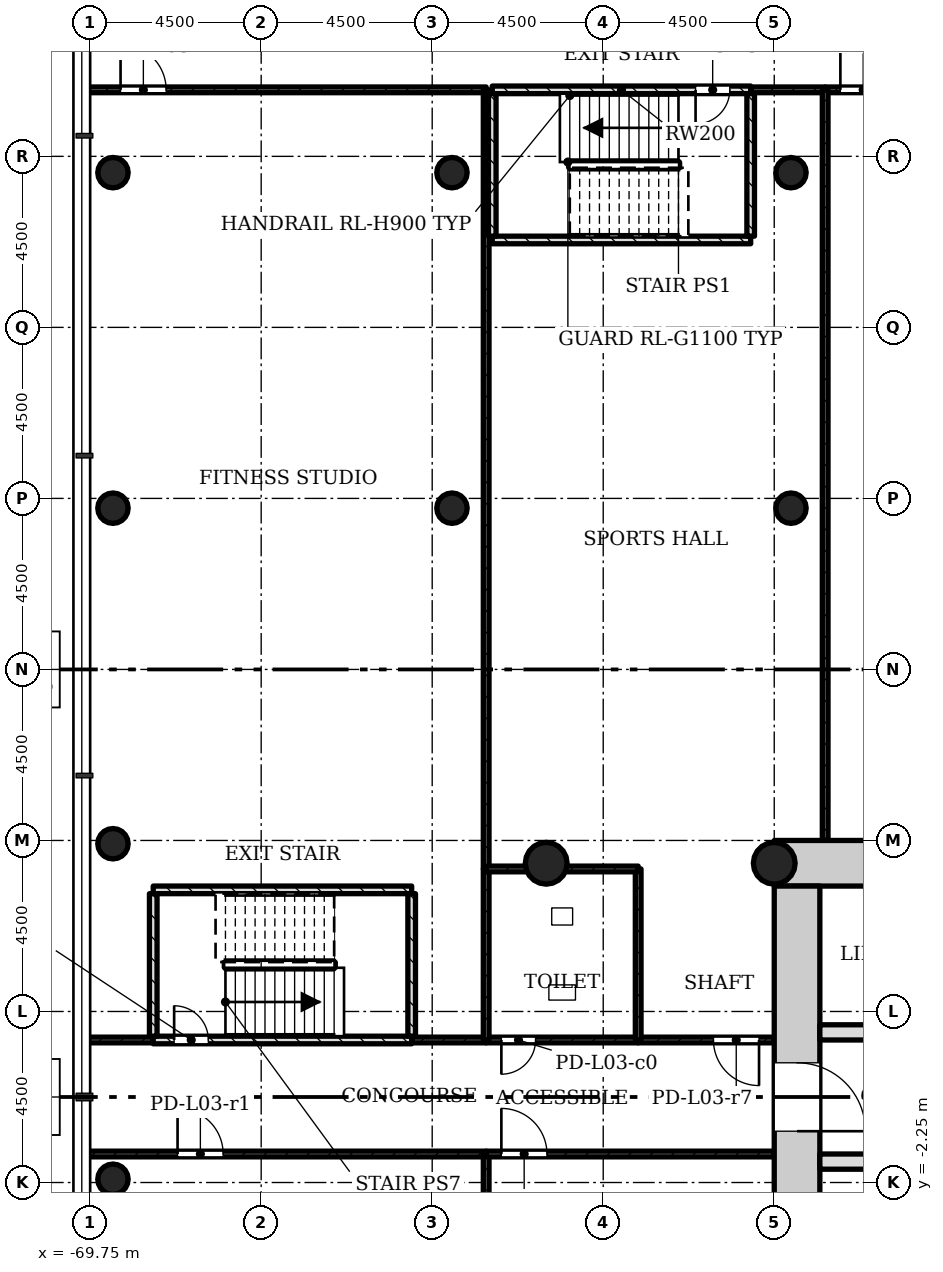
"""IFC4 building model, lengths in metres.
Left out: names, types, materials, properties, quantities, classifications, styles, units other than length and angle.
Written with IfcOpenShell. Run it as: python <this file> out.ifc"""

import sys

from ifc_helpers import new_model, si_unit, direction, frame, frame_2d, origin, origin_2d, place, context, subcontext, project, spatial, rectangle, hollow_circle, extrude, element, fill, save


model = new_model("IFC4")
c1 = context("Model", 3, precision=1e-05, world=origin(), true_north=direction((0.0, 1.0)))
c2 = subcontext(c1, "Body", "Model", "MODEL_VIEW")
j1 = project(units=[si_unit("LENGTHUNIT", "METRE"), si_unit("PLANEANGLEUNIT", "RADIAN")], contexts=[c1])
p1 = place(None, origin())
s1 = spatial("IfcSite", under=j1, at=p1, CompositionType="ELEMENT")
p2 = place(p1, origin())
s2 = spatial("IfcBuilding", under=s1, at=p2, CompositionType="ELEMENT")
p3 = place(p2, frame((0.0, 0.0, 15.5)))
s3 = spatial("IfcBuildingStorey", under=s2, at=p3, CompositionType="ELEMENT", Elevation=15.5)
p4 = place(p3, frame((-43.95, 6.15, 0.0), z_axis=(0.0, 0.0, 1.0), x_axis=(-1.0, 0.0, 0.0)))
e1 = element("IfcWall", 1, at=p4, inside=s3, PredefinedType="SHEAR", context=c2, shape_type="SweptSolid", body=[
    extrude(rectangle(XDim=7.8, YDim=1.2, at=frame_2d((3.9, 0.0))), origin(), (0.0, 0.0, 1.0), 4.5),
])
p5 = place(p3, frame((-51.15, 5.55, 0.0), z_axis=(0.0, 0.0, 1.0), x_axis=(0.0, -1.0, 0.0)))
e2 = element("IfcWall", 2, at=p5, inside=s3, PredefinedType="SHEAR", context=c2, shape_type="SweptSolid", body=[
    extrude(rectangle(XDim=12.3, YDim=1.2, at=frame_2d((6.15, 0.0))), origin(), (0.0, 0.0, 1.0), 4.5),
])
p6 = place(p5, frame((4.65, 0.0, 0.0)))
e3 = element("IfcOpeningElement", 3, at=p6, cuts=e2, PredefinedType="OPENING", context=c2, shape_type="SweptSolid", body=[
    extrude(rectangle(XDim=1.8, YDim=2.1, at=frame_2d((0.9, 1.05))), frame((0.0, 0.61, 0.0), z_axis=(0.0, -1.0, 0.0), x_axis=(1.0, 0.0, 0.0)), (0.0, 0.0, 1.0), 1.22),
])
p7 = place(p3, frame((-50.55, -1.7, 0.0), z_axis=(0.0, 0.0, 1.0), x_axis=(1.0, 0.0, 0.0)))
e4 = element("IfcWall", 4, at=p7, inside=s3, PredefinedType="SHEAR", context=c2, shape_type="SweptSolid", body=[
    extrude(rectangle(XDim=6.6, YDim=0.4, at=frame_2d((3.3, 0.0))), origin(), (0.0, 0.0, 1.0), 4.5),
])
p8 = place(p7, frame((5.25, 0.0, 0.0)))
e5 = element("IfcOpeningElement", 5, at=p8, cuts=e4, PredefinedType="OPENING", context=c2, shape_type="SweptSolid", body=[
    extrude(rectangle(XDim=0.9, YDim=2.1, at=frame_2d((0.45, 1.05))), frame((0.0, 0.21, 0.0), z_axis=(0.0, -1.0, 0.0), x_axis=(1.0, 0.0, 0.0)), (0.0, 0.0, 1.0), 0.42),
])
p9 = place(p3, frame((-50.55, 1.7, 0.0), z_axis=(0.0, 0.0, 1.0), x_axis=(1.0, 0.0, 0.0)))
e6 = element("IfcWall", 6, at=p9, inside=s3, PredefinedType="SHEAR", context=c2, shape_type="SweptSolid", body=[
    extrude(rectangle(XDim=6.6, YDim=0.4, at=frame_2d((3.3, 0.0))), origin(), (0.0, 0.0, 1.0), 4.5),
])
p10 = place(p9, frame((4.95, 0.0, 0.0)))
e7 = element("IfcOpeningElement", 7, at=p10, cuts=e6, PredefinedType="OPENING", context=c2, shape_type="SweptSolid", body=[
    extrude(rectangle(XDim=1.1, YDim=2.1, at=frame_2d((0.55, 1.05))), frame((0.0, 0.21, 0.0), z_axis=(0.0, -1.0, 0.0), x_axis=(1.0, 0.0, 0.0)), (0.0, 0.0, 1.0), 0.42),
])
for number, where, z_axis, x_axis in (
    (8, (-51.75, 6.15, 0.0), (0.0, 0.0, 1.0), (1.0, 0.0, 0.0)),
    (9, (-57.75, 6.15, 0.0), (0.0, 0.0, 1.0), (1.0, 0.0, 0.0)),
):
    element("IfcColumn", number, at=place(p3, frame(where, z_axis=z_axis, x_axis=x_axis)), inside=s3, PredefinedType="COLUMN", context=c2, shape_type="SweptSolid", body=[
        extrude(hollow_circle(Radius=0.55, WallThickness=0.04, at=origin_2d()), origin(), (0.0, 0.0, 1.0), 4.5),
    ])
for number, where, z_axis, x_axis in (
    (10, (-69.15, -2.164, 0.0), (0.0, 0.0, 1.0), (1.0, 0.0, 0.0)),
    (11, (-69.15, 6.664, 0.0), (0.0, 0.0, 1.0), (1.0, 0.0, 0.0)),
    (12, (-69.15, 15.493, 0.0), (0.0, 0.0, 1.0), (1.0, 0.0, 0.0)),
    (13, (-60.23, 15.493, 0.0), (0.0, 0.0, 1.0), (1.0, 0.0, 0.0)),
    (14, (-51.31, 15.493, 0.0), (0.0, 0.0, 1.0), (1.0, 0.0, 0.0)),
    (15, (-69.15, 24.321, 0.0), (0.0, 0.0, 1.0), (1.0, 0.0, 0.0)),
    (16, (-60.23, 24.321, 0.0), (0.0, 0.0, 1.0), (1.0, 0.0, 0.0)),
    (17, (-51.31, 24.321, 0.0), (0.0, 0.0, 1.0), (1.0, 0.0, 0.0)),
):
    element("IfcColumn", number, at=place(p3, frame(where, z_axis=z_axis, x_axis=x_axis)), inside=s3, PredefinedType="COLUMN", context=c2, shape_type="SweptSolid", body=[
        extrude(hollow_circle(Radius=0.4, WallThickness=0.028, at=origin_2d()), origin(), (0.0, 0.0, 1.0), 4.5),
    ])
p11 = place(p3, frame((-69.85, -1.5, 0.0), z_axis=(0.0, 0.0, 1.0), x_axis=(1.0, 0.0, 0.0)))
e18 = element("IfcWall", 18, at=p11, inside=s3, PredefinedType="PARTITIONING", context=c2, shape_type="SweptSolid", body=[
    extrude(rectangle(XDim=10.52, YDim=0.15, at=frame_2d((5.26, 0.0))), origin(), (0.0, 0.0, 1.0), 4.08),
])
p12 = place(p11, frame((2.4, 0.0, 0.0)))
e19 = element("IfcOpeningElement", 19, at=p12, cuts=e18, PredefinedType="OPENING", context=c2, shape_type="SweptSolid", body=[
    extrude(rectangle(XDim=1.2, YDim=2.1, at=frame_2d((0.6, 1.05))), frame((0.0, 0.085, 0.0), z_axis=(0.0, -1.0, 0.0), x_axis=(1.0, 0.0, 0.0)), (0.0, 0.0, 1.0), 0.17),
])
p13 = place(p3, frame((-59.33, -1.5, 0.0), z_axis=(0.0, 0.0, 1.0), x_axis=(0.0, -1.0, 0.0)))
e20 = element("IfcWall", 20, at=p13, inside=s3, PredefinedType="PARTITIONING", context=c2, shape_type="SweptSolid", body=[
    extrude(rectangle(XDim=22.0, YDim=0.15, at=frame_2d((11.0, 0.0))), origin(), (0.0, 0.0, 1.0), 4.08),
])
p14 = place(p3, frame((-59.33, 1.5, 0.0), z_axis=(0.0, 0.0, 1.0), x_axis=(-1.0, 0.0, 0.0)))
e21 = element("IfcWall", 21, at=p14, inside=s3, PredefinedType="PARTITIONING", context=c2, shape_type="SweptSolid", body=[
    extrude(rectangle(XDim=1.96, YDim=0.15, at=frame_2d((0.98, 0.0))), origin(), (0.0, 0.0, 1.0), 4.08),
])
p15 = place(p3, frame((-68.09, 1.5, 0.0), z_axis=(0.0, 0.0, 1.0), x_axis=(-1.0, 0.0, 0.0)))
e22 = element("IfcWall", 22, at=p15, inside=s3, PredefinedType="PARTITIONING", context=c2, shape_type="SweptSolid", body=[
    extrude(rectangle(XDim=1.76, YDim=0.15, at=frame_2d((0.88, 0.0))), origin(), (0.0, 0.0, 1.0), 4.08),
])
p16 = place(p3, frame((-69.85, 26.5, 0.0), z_axis=(0.0, 0.0, 1.0), x_axis=(1.0, 0.0, 0.0)))
e23 = element("IfcWall", 23, at=p16, inside=s3, PredefinedType="PARTITIONING", context=c2, shape_type="SweptSolid", body=[
    extrude(rectangle(XDim=10.52, YDim=0.15, at=frame_2d((5.26, 0.0))), origin(), (0.0, 0.0, 1.0), 4.08),
])
p17 = place(p16, frame((0.9, 0.0, 0.0)))
e24 = element("IfcOpeningElement", 24, at=p17, cuts=e23, PredefinedType="OPENING", context=c2, shape_type="SweptSolid", body=[
    extrude(rectangle(XDim=1.2, YDim=2.1, at=frame_2d((0.6, 1.05))), frame((0.0, 0.085, 0.0), z_axis=(0.0, -1.0, 0.0), x_axis=(1.0, 0.0, 0.0)), (0.0, 0.0, 1.0), 0.17),
])
p18 = place(p3, frame((-59.33, 26.5, 0.0), z_axis=(0.0, 0.0, 1.0), x_axis=(0.0, -1.0, 0.0)))
e25 = element("IfcWall", 25, at=p18, inside=s3, PredefinedType="PARTITIONING", context=c2, shape_type="SweptSolid", body=[
    extrude(rectangle(XDim=20.5, YDim=0.15, at=frame_2d((10.25, 0.0))), origin(), (0.0, 0.0, 1.0), 4.08),
])
p19 = place(p3, frame((-59.33, -1.5, 0.0), z_axis=(0.0, 0.0, 1.0), x_axis=(1.0, 0.0, 0.0)))
e26 = element("IfcWall", 26, at=p19, inside=s3, PredefinedType="PARTITIONING", context=c2, shape_type="SweptSolid", body=[
    extrude(rectangle(XDim=7.58, YDim=0.15, at=frame_2d((3.79, 0.0))), origin(), (0.0, 0.0, 1.0), 4.08),
])
p20 = place(p19, frame((0.4, 0.0, 0.0)))
e27 = element("IfcOpeningElement", 27, at=p20, cuts=e26, PredefinedType="OPENING", context=c2, shape_type="SweptSolid", body=[
    extrude(rectangle(XDim=1.2, YDim=2.1, at=frame_2d((0.6, 1.05))), frame((0.0, 0.085, 0.0), z_axis=(0.0, -1.0, 0.0), x_axis=(1.0, 0.0, 0.0)), (0.0, 0.0, 1.0), 0.17),
])
p21 = place(p3, frame((-51.75, 1.5, 0.0), z_axis=(0.0, 0.0, 1.0), x_axis=(-1.0, 0.0, 0.0)))
e28 = element("IfcWall", 28, at=p21, inside=s3, PredefinedType="PARTITIONING", context=c2, shape_type="SweptSolid", body=[
    extrude(rectangle(XDim=3.58, YDim=0.15, at=frame_2d((1.79, 0.0))), origin(), (0.0, 0.0, 1.0), 4.08),
])
p22 = place(p21, frame((0.4, 0.0, 0.0)))
e29 = element("IfcOpeningElement", 29, at=p22, cuts=e28, PredefinedType="OPENING", context=c2, shape_type="SweptSolid", body=[
    extrude(rectangle(XDim=1.2, YDim=2.1, at=frame_2d((0.6, 1.05))), frame((0.0, 0.085, 0.0), z_axis=(0.0, -1.0, 0.0), x_axis=(1.0, 0.0, 0.0)), (0.0, 0.0, 1.0), 0.17),
])
p23 = place(p3, frame((-52.37, 26.5, 0.0), z_axis=(0.0, 0.0, 1.0), x_axis=(1.0, 0.0, 0.0)))
e30 = element("IfcWall", 30, at=p23, inside=s3, PredefinedType="PARTITIONING", context=c2, shape_type="SweptSolid", body=[
    extrude(rectangle(XDim=1.96, YDim=0.15, at=frame_2d((0.98, 0.0))), origin(), (0.0, 0.0, 1.0), 4.08),
])
p24 = place(p3, frame((-50.41, 26.5, 0.0), z_axis=(0.0, 0.0, 1.0), x_axis=(1.0, 0.0, 0.0)))
e31 = element("IfcWall", 31, at=p24, inside=s3, PredefinedType="PARTITIONING", context=c2, shape_type="SweptSolid", body=[
    extrude(rectangle(XDim=8.92, YDim=0.15, at=frame_2d((4.46, 0.0))), origin(), (0.0, 0.0, 1.0), 4.08),
])
p25 = place(p24, frame((0.4, 0.0, 0.0)))
e32 = element("IfcOpeningElement", 32, at=p25, cuts=e31, PredefinedType="OPENING", context=c2, shape_type="SweptSolid", body=[
    extrude(rectangle(XDim=1.2, YDim=2.1, at=frame_2d((0.6, 1.05))), frame((0.0, 0.085, 0.0), z_axis=(0.0, -1.0, 0.0), x_axis=(1.0, 0.0, 0.0)), (0.0, 0.0, 1.0), 0.17),
])
p26 = place(p3, frame((-50.41, 6.75, 0.0), z_axis=(0.0, 0.0, 1.0), x_axis=(0.0, 1.0, 0.0)))
e33 = element("IfcWall", 33, at=p26, inside=s3, PredefinedType="PARTITIONING", context=c2, shape_type="SweptSolid", body=[
    extrude(rectangle(XDim=19.75, YDim=0.15, at=frame_2d((9.875, 0.0))), origin(), (0.0, 0.0, 1.0), 4.08),
])
p27 = place(p3, frame((-59.33, 1.5, 0.0), z_axis=(0.0, 0.0, 1.0), x_axis=(1.0, 0.0, 0.0)))
e34 = element("IfcWall", 34, at=p27, inside=s3, PredefinedType="PARTITIONING", context=c2, shape_type="SweptSolid", body=[
    extrude(rectangle(XDim=4.0, YDim=0.15, at=frame_2d((2.0, 0.0))), origin(), (0.0, 0.0, 1.0), 4.08),
])
p28 = place(p27, frame((0.4, 0.0, 0.0)))
e35 = element("IfcOpeningElement", 35, at=p28, cuts=e34, PredefinedType="OPENING", context=c2, shape_type="SweptSolid", body=[
    extrude(rectangle(XDim=0.9, YDim=2.1, at=frame_2d((0.45, 1.05))), frame((0.0, 0.085, 0.0), z_axis=(0.0, -1.0, 0.0), x_axis=(1.0, 0.0, 0.0)), (0.0, 0.0, 1.0), 0.17),
])
for number, where, z_axis, x_axis in (
    (36, (-59.33, 6.0, 0.0), (0.0, 0.0, 1.0), (0.0, -1.0, 0.0)),
    (37, (-55.33, 1.5, 0.0), (0.0, 0.0, 1.0), (0.0, 1.0, 0.0)),
):
    element("IfcWall", number, at=place(p3, frame(where, z_axis=z_axis, x_axis=x_axis)), inside=s3, PredefinedType="PARTITIONING", context=c2, shape_type="SweptSolid", body=[
        extrude(rectangle(XDim=4.5, YDim=0.15, at=frame_2d((2.25, 0.0))), origin(), (0.0, 0.0, 1.0), 4.08),
    ])
p29 = place(p3, frame((-55.33, 6.0, 0.0), z_axis=(0.0, 0.0, 1.0), x_axis=(-1.0, 0.0, 0.0)))
e38 = element("IfcWall", 38, at=p29, inside=s3, PredefinedType="PARTITIONING", context=c2, shape_type="SweptSolid", body=[
    extrude(rectangle(XDim=4.0, YDim=0.15, at=frame_2d((2.0, 0.0))), origin(), (0.0, 0.0, 1.0), 4.08),
])
p30 = place(p3, frame((-59.17, 26.5, 0.0), z_axis=(0.0, 0.0, 1.0), x_axis=(1.0, 0.0, 0.0)))
e39 = element("IfcWall", 39, at=p30, inside=s3, PredefinedType="SHEAR", context=c2, shape_type="SweptSolid", body=[
    extrude(rectangle(XDim=6.8, YDim=0.2, at=frame_2d((3.4, 0.0))), origin(), (0.0, 0.0, 1.0), 4.08),
])
p31 = place(p30, frame((5.35, 0.0, 0.0)))
e40 = element("IfcOpeningElement", 40, at=p31, cuts=e39, PredefinedType="OPENING", context=c2, shape_type="SweptSolid", body=[
    extrude(rectangle(XDim=0.9, YDim=2.1, at=frame_2d((0.45, 1.05))), frame((0.0, 0.11, 0.0), z_axis=(0.0, -1.0, 0.0), x_axis=(1.0, 0.0, 0.0)), (0.0, 0.0, 1.0), 0.22),
])
p32 = place(p3, frame((-59.17, 22.55, 0.0), z_axis=(0.0, 0.0, 1.0), x_axis=(1.0, 0.0, 0.0)))
e41 = element("IfcWall", 41, at=p32, inside=s3, PredefinedType="SHEAR", context=c2, shape_type="SweptSolid", body=[
    extrude(rectangle(XDim=6.8, YDim=0.2, at=frame_2d((3.4, 0.0))), origin(), (0.0, 0.0, 1.0), 4.08),
])
for number, where, z_axis, x_axis in (
    (42, (-59.17, 22.65, 0.0), (0.0, 0.0, 1.0), (0.0, 1.0, 0.0)),
    (43, (-52.37, 22.65, 0.0), (0.0, 0.0, 1.0), (0.0, 1.0, 0.0)),
):
    element("IfcWall", number, at=place(p3, frame(where, z_axis=z_axis, x_axis=x_axis)), inside=s3, PredefinedType="SHEAR", context=c2, shape_type="SweptSolid", body=[
        extrude(rectangle(XDim=3.75, YDim=0.2, at=frame_2d((1.875, 0.0))), origin(), (0.0, 0.0, 1.0), 4.08),
    ])
p33 = place(p3, frame((-68.09, 1.5, 0.0), z_axis=(0.0, 0.0, 1.0), x_axis=(1.0, 0.0, 0.0)))
e44 = element("IfcWall", 44, at=p33, inside=s3, PredefinedType="SHEAR", context=c2, shape_type="SweptSolid", body=[
    extrude(rectangle(XDim=6.8, YDim=0.2, at=frame_2d((3.4, 0.0))), origin(), (0.0, 0.0, 1.0), 4.08),
])
p34 = place(p33, frame((0.55, 0.0, 0.0)))
e45 = element("IfcOpeningElement", 45, at=p34, cuts=e44, PredefinedType="OPENING", context=c2, shape_type="SweptSolid", body=[
    extrude(rectangle(XDim=0.9, YDim=2.1, at=frame_2d((0.45, 1.05))), frame((0.0, 0.11, 0.0), z_axis=(0.0, -1.0, 0.0), x_axis=(1.0, 0.0, 0.0)), (0.0, 0.0, 1.0), 0.22),
])
p35 = place(p3, frame((-68.09, 5.45, 0.0), z_axis=(0.0, 0.0, 1.0), x_axis=(1.0, 0.0, 0.0)))
e46 = element("IfcWall", 46, at=p35, inside=s3, PredefinedType="SHEAR", context=c2, shape_type="SweptSolid", body=[
    extrude(rectangle(XDim=6.8, YDim=0.2, at=frame_2d((3.4, 0.0))), origin(), (0.0, 0.0, 1.0), 4.08),
])
for number, where, z_axis, x_axis in (
    (47, (-68.09, 1.6, 0.0), (0.0, 0.0, 1.0), (0.0, 1.0, 0.0)),
    (48, (-61.29, 1.6, 0.0), (0.0, 0.0, 1.0), (0.0, 1.0, 0.0)),
):
    element("IfcWall", number, at=place(p3, frame(where, z_axis=z_axis, x_axis=x_axis)), inside=s3, PredefinedType="SHEAR", context=c2, shape_type="SweptSolid", body=[
        extrude(rectangle(XDim=3.75, YDim=0.2, at=frame_2d((1.875, 0.0))), origin(), (0.0, 0.0, 1.0), 4.08),
    ])
p36 = place(p12, origin())
e49 = element("IfcDoor", 49, at=p36, inside=s3, OperationType="SINGLE_SWING_RIGHT", PredefinedType="DOOR", context=c2, shape_type="SweptSolid", body=[
    extrude(rectangle(XDim=1.2, YDim=2.1, at=frame_2d((0.6, 1.05))), frame((0.0, 0.025, 0.0), z_axis=(0.0, -1.0, 0.0), x_axis=(1.0, 0.0, 0.0)), (0.0, 0.0, 1.0), 0.05),
])
fill(e19, e49)
p37 = place(p17, origin())
e50 = element("IfcDoor", 50, at=p37, inside=s3, OperationType="SINGLE_SWING_RIGHT", PredefinedType="DOOR", context=c2, shape_type="SweptSolid", body=[
    extrude(rectangle(XDim=1.2, YDim=2.1, at=frame_2d((0.6, 1.05))), frame((0.0, 0.025, 0.0), z_axis=(0.0, -1.0, 0.0), x_axis=(1.0, 0.0, 0.0)), (0.0, 0.0, 1.0), 0.05),
])
fill(e24, e50)
p38 = place(p20, origin())
e51 = element("IfcDoor", 51, at=p38, inside=s3, OperationType="SINGLE_SWING_RIGHT", PredefinedType="DOOR", context=c2, shape_type="SweptSolid", body=[
    extrude(rectangle(XDim=1.2, YDim=2.1, at=frame_2d((0.6, 1.05))), frame((0.0, 0.025, 0.0), z_axis=(0.0, -1.0, 0.0), x_axis=(1.0, 0.0, 0.0)), (0.0, 0.0, 1.0), 0.05),
])
fill(e27, e51)
p39 = place(p22, origin())
e52 = element("IfcDoor", 52, at=p39, inside=s3, OperationType="SINGLE_SWING_RIGHT", PredefinedType="DOOR", context=c2, shape_type="SweptSolid", body=[
    extrude(rectangle(XDim=1.2, YDim=2.1, at=frame_2d((0.6, 1.05))), frame((0.0, 0.025, 0.0), z_axis=(0.0, -1.0, 0.0), x_axis=(1.0, 0.0, 0.0)), (0.0, 0.0, 1.0), 0.05),
])
fill(e29, e52)
p40 = place(p25, origin())
e53 = element("IfcDoor", 53, at=p40, inside=s3, OperationType="SINGLE_SWING_RIGHT", PredefinedType="DOOR", context=c2, shape_type="SweptSolid", body=[
    extrude(rectangle(XDim=1.2, YDim=2.1, at=frame_2d((0.6, 1.05))), frame((0.0, 0.025, 0.0), z_axis=(0.0, -1.0, 0.0), x_axis=(1.0, 0.0, 0.0)), (0.0, 0.0, 1.0), 0.05),
])
fill(e32, e53)
p41 = place(p28, origin())
e54 = element("IfcDoor", 54, at=p41, inside=s3, OperationType="SINGLE_SWING_LEFT", PredefinedType="DOOR", context=c2, shape_type="SweptSolid", body=[
    extrude(rectangle(XDim=0.9, YDim=2.1, at=frame_2d((0.45, 1.05))), frame((0.0, 0.025, 0.0), z_axis=(0.0, -1.0, 0.0), x_axis=(1.0, 0.0, 0.0)), (0.0, 0.0, 1.0), 0.05),
])
fill(e35, e54)
p42 = place(p31, origin())
e55 = element("IfcDoor", 55, at=p42, inside=s3, OperationType="SINGLE_SWING_LEFT", PredefinedType="DOOR", context=c2, shape_type="SweptSolid", body=[
    extrude(rectangle(XDim=0.9, YDim=2.1, at=frame_2d((0.45, 1.05))), frame((0.0, 0.025, 0.0), z_axis=(0.0, -1.0, 0.0), x_axis=(1.0, 0.0, 0.0)), (0.0, 0.0, 1.0), 0.05),
])
fill(e40, e55)
p43 = place(p34, origin())
e56 = element("IfcDoor", 56, at=p43, inside=s3, OperationType="SINGLE_SWING_RIGHT", PredefinedType="DOOR", context=c2, shape_type="SweptSolid", body=[
    extrude(rectangle(XDim=0.9, YDim=2.1, at=frame_2d((0.45, 1.05))), frame((0.0, 0.025, 0.0), z_axis=(0.0, -1.0, 0.0), x_axis=(1.0, 0.0, 0.0)), (0.0, 0.0, 1.0), 0.05),
])
fill(e45, e56)
p44 = place(p6, origin())
e57 = element("IfcDoor", 57, at=p44, inside=s3, OperationType="SINGLE_SWING_LEFT", PredefinedType="DOOR", context=c2, shape_type="SweptSolid", body=[
    extrude(rectangle(XDim=1.8, YDim=2.1, at=frame_2d((0.9, 1.05))), frame((0.0, 0.025, 0.0), z_axis=(0.0, -1.0, 0.0), x_axis=(1.0, 0.0, 0.0)), (0.0, 0.0, 1.0), 0.05),
])
fill(e3, e57)
save(model, sys.argv[1])
